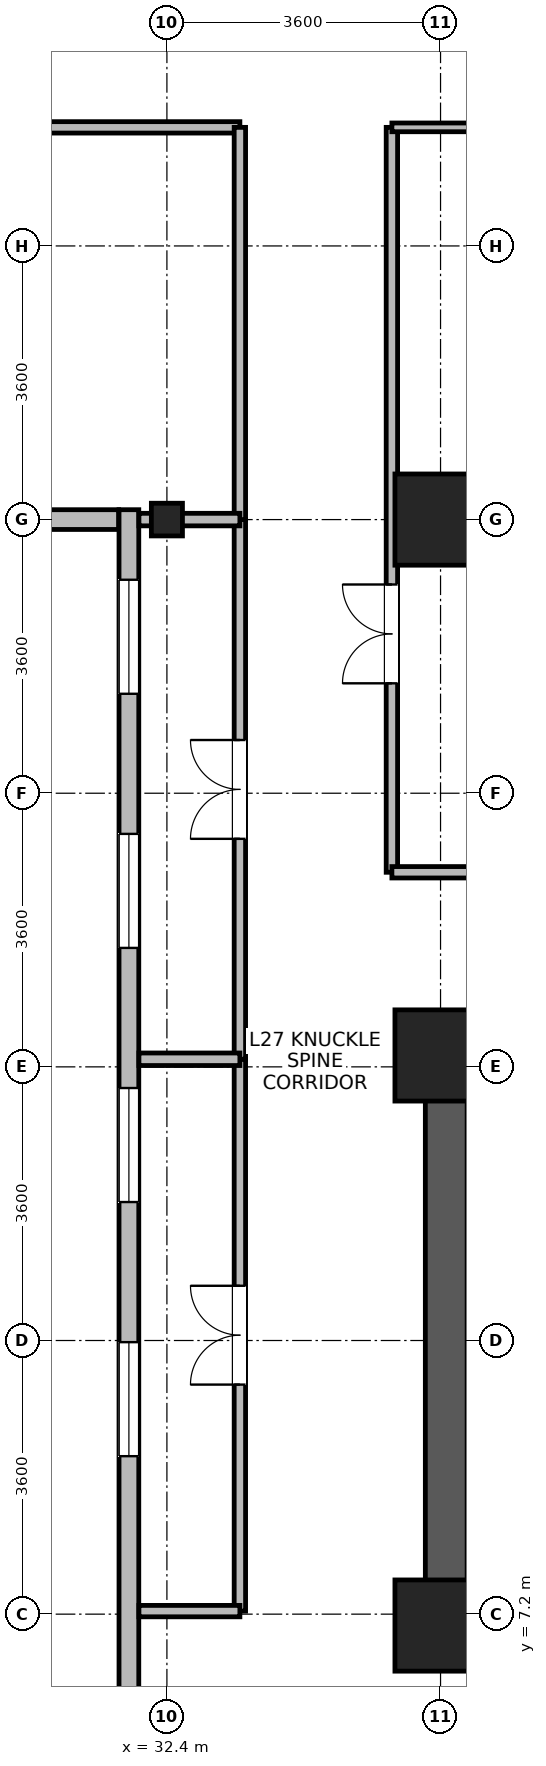
"""IFC4 building model, lengths in metres.
Left out: names, types, materials, properties, quantities, classifications, styles, units other than length and angle.
Written with IfcOpenShell. Run it as: python <this file> out.ifc"""

import sys

from ifc_helpers import new_model, si_unit, direction, frame, frame_2d, origin, origin_2d, place, context, subcontext, project, spatial, rectangle, i_section, extrude, source, transform, mapped, element, fill, save


model = new_model("IFC4")
c1 = context("Model", 3, precision=1e-05, world=origin(), true_north=direction((0.0, 1.0)))
c2 = subcontext(c1, "Body", "Model", "MODEL_VIEW")
j1 = project(units=[si_unit("LENGTHUNIT", "METRE"), si_unit("PLANEANGLEUNIT", "RADIAN")], contexts=[c1])
p1 = place(None, origin())
s1 = spatial("IfcSite", under=j1, at=p1, CompositionType="ELEMENT")
p2 = place(p1, origin())
s2 = spatial("IfcBuilding", under=s1, at=p2, CompositionType="ELEMENT")
p3 = place(p2, frame((0.0, 0.0, 108.2)))
s3 = spatial("IfcBuildingStorey", under=s2, at=p3, CompositionType="ELEMENT", Elevation=108.2)
p4 = place(p3, frame((36.075, 6.75, 0.0), z_axis=(0.0, 0.0, 1.0), x_axis=(0.0, 1.0, 0.0)))
e1 = element("IfcWall", 1, at=p4, inside=s3, PredefinedType="SHEAR", context=c2, shape_type="SweptSolid", body=[
    extrude(rectangle(XDim=8.1, YDim=0.55, at=frame_2d((4.05, 0.0))), origin(), (0.0, 0.0, 1.0), 3.45),
])
m1 = source(origin(), c2, "Body", "SweptSolid", [
    extrude(rectangle(XDim=1.2, YDim=1.2, at=origin_2d()), origin(), (0.0, 0.0, 1.0), 3.7),
])
for number, where, z_axis, x_axis in (
    (2, (36.0, 21.6, 0.0), (0.0, 0.0, 1.0), (1.0, 0.0, 0.0)),
    (3, (36.0, 7.05, 0.0), (0.0, 0.0, 1.0), (1.0, 0.0, 0.0)),
    (4, (36.0, 14.55, 0.0), (0.0, 0.0, 1.0), (1.0, 0.0, 0.0)),
):
    element("IfcColumn", number, at=place(p3, frame(where, z_axis=z_axis, x_axis=x_axis)), inside=s3, PredefinedType="COLUMN", context=c2, shape_type="MappedRepresentation", body=[
        mapped(m1, transform((0.0, 0.0, 0.0), x_axis=(1.0, 0.0, 0.0), y_axis=(0.0, 1.0, 0.0), z_axis=(0.0, 0.0, 1.0), scale=1.0)),
    ])
m2 = source(origin(), c2, "Body", "SweptSolid", [
    extrude(i_section(OverallWidth=0.409, OverallDepth=0.43, WebThickness=0.024, FlangeThickness=0.033, FilletRadius=0.015, at=origin_2d()), origin(), (0.0, 0.0, 1.0), 3.7),
])
p5 = place(p3, frame((32.4, 21.6, 0.0), z_axis=(0.0, 0.0, 1.0), x_axis=(1.0, 0.0, 0.0)))
e5 = element("IfcColumn", 5, at=p5, inside=s3, PredefinedType="COLUMN", context=c2, shape_type="MappedRepresentation", body=[
    mapped(m2, transform((0.0, 0.0, 0.0), x_axis=(1.0, 0.0, 0.0), y_axis=(0.0, 1.0, 0.0), z_axis=(0.0, 0.0, 1.0), scale=1.0)),
])
p6 = place(p3, frame((31.765, 21.6, 0.0), z_axis=(0.0, 0.0, 1.0), x_axis=(-1.0, 0.0, 0.0)))
e6 = element("IfcWall", 6, at=p6, inside=s3, PredefinedType="STANDARD", context=c2, shape_type="SweptSolid", body=[
    extrude(rectangle(XDim=2.364, YDim=0.26, at=frame_2d((1.182, 0.0))), origin(), (0.0, 0.0, 1.0), 2.98),
])
p7 = place(p3, frame((31.9, 1.67, 0.0), z_axis=(0.0, 0.0, 1.0), x_axis=(0.0, 1.0, 0.0)))
e7 = element("IfcWall", 7, at=p7, inside=s3, PredefinedType="STANDARD", context=c2, shape_type="SweptSolid", body=[
    extrude(rectangle(XDim=20.06, YDim=0.26, at=frame_2d((10.03, 0.0))), origin(), (0.0, 0.0, 1.0), 3.43),
])
p8 = place(p7, frame((0.922, 0.0, 0.85)))
e8 = element("IfcOpeningElement", 8, at=p8, cuts=e7, PredefinedType="OPENING", context=c2, shape_type="SweptSolid", body=[
    extrude(rectangle(XDim=1.5, YDim=1.85, at=frame_2d((0.75, 0.925))), frame((0.0, 0.14, 0.0), z_axis=(0.0, -1.0, 0.0), x_axis=(1.0, 0.0, 0.0)), (0.0, 0.0, 1.0), 0.28),
])
p9 = place(p7, frame((7.608, 0.0, 0.85)))
e9 = element("IfcOpeningElement", 9, at=p9, cuts=e7, PredefinedType="OPENING", context=c2, shape_type="SweptSolid", body=[
    extrude(rectangle(XDim=1.5, YDim=1.85, at=frame_2d((0.75, 0.925))), frame((0.0, 0.14, 0.0), z_axis=(0.0, -1.0, 0.0), x_axis=(1.0, 0.0, 0.0)), (0.0, 0.0, 1.0), 0.28),
])
p10 = place(p7, frame((10.952, 0.0, 0.85)))
e10 = element("IfcOpeningElement", 10, at=p10, cuts=e7, PredefinedType="OPENING", context=c2, shape_type="SweptSolid", body=[
    extrude(rectangle(XDim=1.5, YDim=1.85, at=frame_2d((0.75, 0.925))), frame((0.0, 0.14, 0.0), z_axis=(0.0, -1.0, 0.0), x_axis=(1.0, 0.0, 0.0)), (0.0, 0.0, 1.0), 0.28),
])
p11 = place(p7, frame((14.295, 0.0, 0.85)))
e11 = element("IfcOpeningElement", 11, at=p11, cuts=e7, PredefinedType="OPENING", context=c2, shape_type="SweptSolid", body=[
    extrude(rectangle(XDim=1.5, YDim=1.85, at=frame_2d((0.75, 0.925))), frame((0.0, 0.14, 0.0), z_axis=(0.0, -1.0, 0.0), x_axis=(1.0, 0.0, 0.0)), (0.0, 0.0, 1.0), 0.28),
])
p12 = place(p7, frame((17.638, 0.0, 0.85)))
e12 = element("IfcOpeningElement", 12, at=p12, cuts=e7, PredefinedType="OPENING", context=c2, shape_type="SweptSolid", body=[
    extrude(rectangle(XDim=1.5, YDim=1.85, at=frame_2d((0.75, 0.925))), frame((0.0, 0.14, 0.0), z_axis=(0.0, -1.0, 0.0), x_axis=(1.0, 0.0, 0.0)), (0.0, 0.0, 1.0), 0.28),
])
p13 = place(p3, frame((35.36, 16.96, 0.0), z_axis=(0.0, 0.0, 1.0), x_axis=(0.0, 1.0, 0.0)))
e13 = element("IfcWall", 13, at=p13, inside=s3, PredefinedType="PARTITIONING", context=c2, shape_type="SweptSolid", body=[
    extrude(rectangle(XDim=9.8, YDim=0.15, at=frame_2d((4.9, 0.0))), origin(), (0.0, 0.0, 1.0), 3.43),
])
p14 = place(p13, frame((2.486, 0.0, 0.0)))
e14 = element("IfcOpeningElement", 14, at=p14, cuts=e13, PredefinedType="OPENING", context=c2, shape_type="SweptSolid", body=[
    extrude(rectangle(XDim=1.3, YDim=2.12, at=frame_2d((0.65, 1.06))), frame((0.0, 0.085, 0.0), z_axis=(0.0, -1.0, 0.0), x_axis=(1.0, 0.0, 0.0)), (0.0, 0.0, 1.0), 0.17),
])
p15 = place(p3, frame((24.04, 26.76, 0.0), z_axis=(0.0, 0.0, 1.0), x_axis=(1.0, 0.0, 0.0)))
e15 = element("IfcWall", 15, at=p15, inside=s3, PredefinedType="PARTITIONING", context=c2, shape_type="SweptSolid", body=[
    extrude(rectangle(XDim=9.32, YDim=0.15, at=frame_2d((4.66, 0.0))), origin(), (0.0, 0.0, 1.0), 3.43),
])
p16 = place(p15, frame((4.01, 0.0, 0.0)))
e16 = element("IfcOpeningElement", 16, at=p16, cuts=e15, PredefinedType="OPENING", context=c2, shape_type="SweptSolid", body=[
    extrude(rectangle(XDim=1.3, YDim=2.12, at=frame_2d((0.65, 1.06))), frame((0.0, 0.085, 0.0), z_axis=(0.0, -1.0, 0.0), x_axis=(1.0, 0.0, 0.0)), (0.0, 0.0, 1.0), 0.17),
])
p17 = place(p3, frame((35.36, 16.96, 0.0), z_axis=(0.0, 0.0, 1.0), x_axis=(1.0, 0.0, 0.0)))
e17 = element("IfcWall", 17, at=p17, inside=s3, PredefinedType="PARTITIONING", context=c2, shape_type="SweptSolid", body=[
    extrude(rectangle(XDim=7.84, YDim=0.15, at=frame_2d((3.92, 0.0))), origin(), (0.0, 0.0, 1.0), 3.43),
])
p18 = place(p3, frame((33.36, 7.24, 0.0), z_axis=(0.0, 0.0, 1.0), x_axis=(0.0, 1.0, 0.0)))
e18 = element("IfcWall", 18, at=p18, inside=s3, PredefinedType="PARTITIONING", context=c2, shape_type="SweptSolid", body=[
    extrude(rectangle(XDim=7.26, YDim=0.15, at=frame_2d((3.63, 0.0))), origin(), (0.0, 0.0, 1.0), 3.43),
])
p19 = place(p18, frame((2.98, 0.0, 0.0)))
e19 = element("IfcOpeningElement", 19, at=p19, cuts=e18, PredefinedType="OPENING", context=c2, shape_type="SweptSolid", body=[
    extrude(rectangle(XDim=1.3, YDim=2.12, at=frame_2d((0.65, 1.06))), frame((0.0, 0.085, 0.0), z_axis=(0.0, -1.0, 0.0), x_axis=(1.0, 0.0, 0.0)), (0.0, 0.0, 1.0), 0.17),
])
p20 = place(p3, frame((33.36, 14.5, 0.0), z_axis=(0.0, 0.0, 1.0), x_axis=(0.0, 1.0, 0.0)))
e20 = element("IfcWall", 20, at=p20, inside=s3, PredefinedType="PARTITIONING", context=c2, shape_type="SweptSolid", body=[
    extrude(rectangle(XDim=7.1, YDim=0.15, at=frame_2d((3.55, 0.0))), origin(), (0.0, 0.0, 1.0), 3.43),
])
p21 = place(p20, frame((2.9, 0.0, 0.0)))
e21 = element("IfcOpeningElement", 21, at=p21, cuts=e20, PredefinedType="OPENING", context=c2, shape_type="SweptSolid", body=[
    extrude(rectangle(XDim=1.3, YDim=2.12, at=frame_2d((0.65, 1.06))), frame((0.0, 0.085, 0.0), z_axis=(0.0, -1.0, 0.0), x_axis=(1.0, 0.0, 0.0)), (0.0, 0.0, 1.0), 0.17),
])
p22 = place(p3, frame((33.36, 21.6, 0.0), z_axis=(0.0, 0.0, 1.0), x_axis=(0.0, 1.0, 0.0)))
e22 = element("IfcWall", 22, at=p22, inside=s3, PredefinedType="PARTITIONING", context=c2, shape_type="SweptSolid", body=[
    extrude(rectangle(XDim=5.16, YDim=0.15, at=frame_2d((2.58, 0.0))), origin(), (0.0, 0.0, 1.0), 3.43),
])
p23 = place(p3, frame((32.032, 7.24, 0.0), z_axis=(0.0, 0.0, 1.0), x_axis=(1.0, 0.0, 0.0)))
e23 = element("IfcWall", 23, at=p23, inside=s3, PredefinedType="PARTITIONING", context=c2, shape_type="SweptSolid", body=[
    extrude(rectangle(XDim=1.328, YDim=0.15, at=frame_2d((0.664, 0.0))), origin(), (0.0, 0.0, 1.0), 3.43),
])
p24 = place(p3, frame((35.36, 26.76, 0.0), z_axis=(0.0, 0.0, 1.0), x_axis=(1.0, 0.0, 0.0)))
e24 = element("IfcWall", 24, at=p24, inside=s3, PredefinedType="PARTITIONING", context=c2, shape_type="SweptSolid", body=[
    extrude(rectangle(XDim=7.84, YDim=0.115, at=frame_2d((3.92, 0.0))), origin(), (0.0, 0.0, 1.0), 3.43),
])
p25 = place(p3, frame((32.032, 14.5, 0.0), z_axis=(0.0, 0.0, 1.0), x_axis=(1.0, 0.0, 0.0)))
e25 = element("IfcWall", 25, at=p25, inside=s3, PredefinedType="PARTITIONING", context=c2, shape_type="SweptSolid", body=[
    extrude(rectangle(XDim=1.328, YDim=0.165, at=frame_2d((0.664, 0.0))), origin(), (0.0, 0.0, 1.0), 3.43),
])
p26 = place(p3, frame((32.032, 21.6, 0.0), z_axis=(0.0, 0.0, 1.0), x_axis=(1.0, 0.0, 0.0)))
e26 = element("IfcWall", 26, at=p26, inside=s3, PredefinedType="PARTITIONING", context=c2, shape_type="SweptSolid", body=[
    extrude(rectangle(XDim=1.328, YDim=0.165, at=frame_2d((0.664, 0.0))), origin(), (0.0, 0.0, 1.0), 2.98),
])
p27 = place(p9, origin())
e27 = element("IfcWindow", 27, at=p27, inside=s3, PartitioningType="SINGLE_PANEL", PredefinedType="WINDOW", context=c2, shape_type="SweptSolid", body=[
    extrude(rectangle(XDim=1.5, YDim=1.85, at=frame_2d((0.75, 0.925))), frame((0.0, 0.03, 0.0), z_axis=(0.0, -1.0, 0.0), x_axis=(1.0, 0.0, 0.0)), (0.0, 0.0, 1.0), 0.06),
])
fill(e9, e27)
p28 = place(p10, origin())
e28 = element("IfcWindow", 28, at=p28, inside=s3, PartitioningType="SINGLE_PANEL", PredefinedType="WINDOW", context=c2, shape_type="SweptSolid", body=[
    extrude(rectangle(XDim=1.5, YDim=1.85, at=frame_2d((0.75, 0.925))), frame((0.0, 0.03, 0.0), z_axis=(0.0, -1.0, 0.0), x_axis=(1.0, 0.0, 0.0)), (0.0, 0.0, 1.0), 0.06),
])
fill(e10, e28)
p29 = place(p11, origin())
e29 = element("IfcWindow", 29, at=p29, inside=s3, PartitioningType="SINGLE_PANEL", PredefinedType="WINDOW", context=c2, shape_type="SweptSolid", body=[
    extrude(rectangle(XDim=1.5, YDim=1.85, at=frame_2d((0.75, 0.925))), frame((0.0, 0.03, 0.0), z_axis=(0.0, -1.0, 0.0), x_axis=(1.0, 0.0, 0.0)), (0.0, 0.0, 1.0), 0.06),
])
fill(e11, e29)
p30 = place(p12, origin())
e30 = element("IfcWindow", 30, at=p30, inside=s3, PartitioningType="SINGLE_PANEL", PredefinedType="WINDOW", context=c2, shape_type="SweptSolid", body=[
    extrude(rectangle(XDim=1.5, YDim=1.85, at=frame_2d((0.75, 0.925))), frame((0.0, 0.03, 0.0), z_axis=(0.0, -1.0, 0.0), x_axis=(1.0, 0.0, 0.0)), (0.0, 0.0, 1.0), 0.06),
])
fill(e12, e30)
p31 = place(p14, origin())
e31 = element("IfcDoor", 31, at=p31, inside=s3, OperationType="DOUBLE_DOOR_SINGLE_SWING", PredefinedType="DOOR", context=c2, shape_type="SweptSolid", body=[
    extrude(rectangle(XDim=1.3, YDim=2.12, at=frame_2d((0.65, 1.06))), frame((0.0, 0.025, 0.0), z_axis=(0.0, -1.0, 0.0), x_axis=(1.0, 0.0, 0.0)), (0.0, 0.0, 1.0), 0.05),
])
fill(e14, e31)
p32 = place(p19, origin())
e32 = element("IfcDoor", 32, at=p32, inside=s3, OperationType="DOUBLE_DOOR_SINGLE_SWING", PredefinedType="DOOR", context=c2, shape_type="SweptSolid", body=[
    extrude(rectangle(XDim=1.3, YDim=2.12, at=frame_2d((0.65, 1.06))), frame((0.0, 0.025, 0.0), z_axis=(0.0, -1.0, 0.0), x_axis=(1.0, 0.0, 0.0)), (0.0, 0.0, 1.0), 0.05),
])
fill(e19, e32)
p33 = place(p21, origin())
e33 = element("IfcDoor", 33, at=p33, inside=s3, OperationType="DOUBLE_DOOR_SINGLE_SWING", PredefinedType="DOOR", context=c2, shape_type="SweptSolid", body=[
    extrude(rectangle(XDim=1.3, YDim=2.12, at=frame_2d((0.65, 1.06))), frame((0.0, 0.025, 0.0), z_axis=(0.0, -1.0, 0.0), x_axis=(1.0, 0.0, 0.0)), (0.0, 0.0, 1.0), 0.05),
])
fill(e21, e33)
save(model, sys.argv[1])
